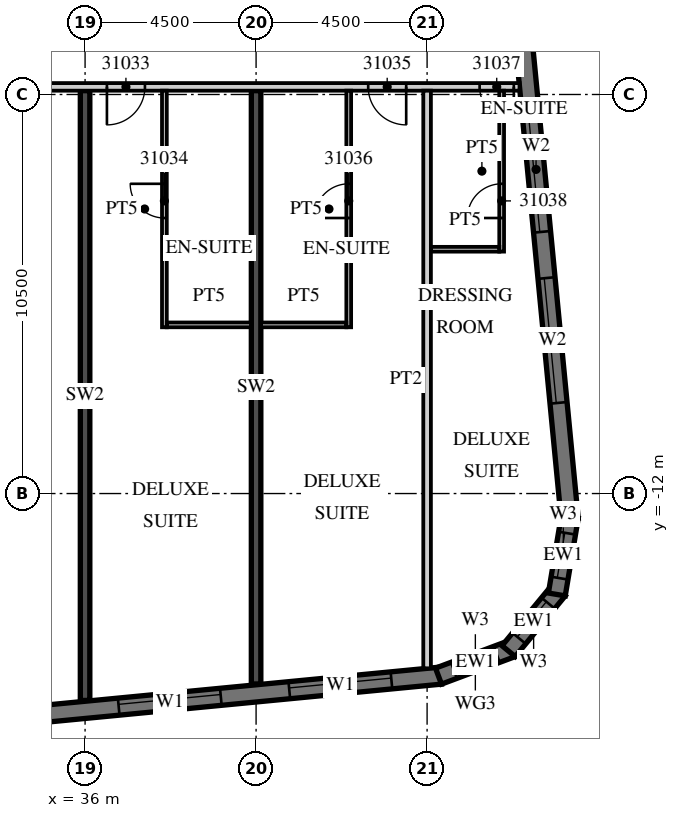
"""IFC4 building model, lengths in metres.
Left out: names, types, materials, properties, quantities, classifications, styles, units other than length and angle.
Written with IfcOpenShell. Run it as: python <this file> out.ifc"""

import sys

from ifc_helpers import new_model, si_unit, direction, frame, frame_2d, origin, place, context, subcontext, project, spatial, polyline, rectangle, outline, extrude, element, fill, save


model = new_model("IFC4")
c1 = context("Model", 3, precision=1e-05, world=origin(), true_north=direction((0.0, 1.0)))
c2 = subcontext(c1, "Body", "Model", "MODEL_VIEW")
j1 = project(units=[si_unit("LENGTHUNIT", "METRE"), si_unit("PLANEANGLEUNIT", "RADIAN")], contexts=[c1])
p1 = place(None, origin())
s1 = spatial("IfcSite", under=j1, at=p1, CompositionType="ELEMENT")
p2 = place(p1, origin())
s2 = spatial("IfcBuilding", under=s1, at=p2, CompositionType="ELEMENT")
p3 = place(p2, frame((0.0, 0.0, 137.2)))
s3 = spatial("IfcBuildingStorey", under=s2, at=p3, CompositionType="ELEMENT", Elevation=137.2)
p4 = place(p3, frame((36.0, -17.444, 0.0), z_axis=(0.0, 0.0, 1.0), x_axis=(0.0, 1.0, 0.0)))
e1 = element("IfcWall", 1, at=p4, inside=s3, PredefinedType="SHEAR", context=c2, shape_type="SweptSolid", body=[
    extrude(rectangle(XDim=16.044, YDim=0.25, at=frame_2d((8.022, 0.0))), origin(), (0.0, 0.0, 1.0), 3.3),
])
p5 = place(p3, frame((40.5, -17.011, 0.0), z_axis=(0.0, 0.0, 1.0), x_axis=(0.0, 1.0, 0.0)))
e2 = element("IfcWall", 2, at=p5, inside=s3, PredefinedType="SHEAR", context=c2, shape_type="SweptSolid", body=[
    extrude(rectangle(XDim=15.611, YDim=0.25, at=frame_2d((7.805, 0.0))), origin(), (0.0, 0.0, 1.0), 3.3),
])
p6 = place(p3, frame((-13.521, -22.46, 0.0), z_axis=(0.0, 0.0, 1.0), x_axis=(0.995396096335, 0.095846812164, 0.0)))
e3 = element("IfcWall", 3, at=p6, inside=s3, PredefinedType="SOLIDWALL", context=c2, shape_type="SweptSolid", body=[
    extrude(rectangle(XDim=59.151, YDim=0.45, at=frame_2d((29.575, 0.0))), origin(), (0.0, 0.0, 1.0), 3.02),
])
p7 = place(p6, frame((0.91, 0.0, 0.45)))
e4 = element("IfcOpeningElement", 4, at=p7, cuts=e3, PredefinedType="OPENING", context=c2, shape_type="SweptSolid", body=[
    extrude(rectangle(XDim=2.7, YDim=2.25, at=frame_2d((1.35, 1.125))), frame((0.0, 0.235, 0.0), z_axis=(0.0, -1.0, 0.0), x_axis=(1.0, 0.0, 0.0)), (0.0, 0.0, 1.0), 0.47),
])
p8 = place(p6, frame((5.431, 0.0, 0.45)))
e5 = element("IfcOpeningElement", 5, at=p8, cuts=e3, PredefinedType="OPENING", context=c2, shape_type="SweptSolid", body=[
    extrude(rectangle(XDim=2.7, YDim=2.25, at=frame_2d((1.35, 1.125))), frame((0.0, 0.235, 0.0), z_axis=(0.0, -1.0, 0.0), x_axis=(1.0, 0.0, 0.0)), (0.0, 0.0, 1.0), 0.47),
])
p9 = place(p6, frame((9.952, 0.0, 0.45)))
e6 = element("IfcOpeningElement", 6, at=p9, cuts=e3, PredefinedType="OPENING", context=c2, shape_type="SweptSolid", body=[
    extrude(rectangle(XDim=2.7, YDim=2.25, at=frame_2d((1.35, 1.125))), frame((0.0, 0.235, 0.0), z_axis=(0.0, -1.0, 0.0), x_axis=(1.0, 0.0, 0.0)), (0.0, 0.0, 1.0), 0.47),
])
p10 = place(p6, frame((14.473, 0.0, 0.45)))
e7 = element("IfcOpeningElement", 7, at=p10, cuts=e3, PredefinedType="OPENING", context=c2, shape_type="SweptSolid", body=[
    extrude(rectangle(XDim=2.7, YDim=2.25, at=frame_2d((1.35, 1.125))), frame((0.0, 0.235, 0.0), z_axis=(0.0, -1.0, 0.0), x_axis=(1.0, 0.0, 0.0)), (0.0, 0.0, 1.0), 0.47),
])
p11 = place(p6, frame((18.994, 0.0, 0.45)))
e8 = element("IfcOpeningElement", 8, at=p11, cuts=e3, PredefinedType="OPENING", context=c2, shape_type="SweptSolid", body=[
    extrude(rectangle(XDim=2.7, YDim=2.25, at=frame_2d((1.35, 1.125))), frame((0.0, 0.235, 0.0), z_axis=(0.0, -1.0, 0.0), x_axis=(1.0, 0.0, 0.0)), (0.0, 0.0, 1.0), 0.47),
])
p12 = place(p6, frame((23.514, 0.0, 0.45)))
e9 = element("IfcOpeningElement", 9, at=p12, cuts=e3, PredefinedType="OPENING", context=c2, shape_type="SweptSolid", body=[
    extrude(rectangle(XDim=2.7, YDim=2.25, at=frame_2d((1.35, 1.125))), frame((0.0, 0.235, 0.0), z_axis=(0.0, -1.0, 0.0), x_axis=(1.0, 0.0, 0.0)), (0.0, 0.0, 1.0), 0.47),
])
p13 = place(p6, frame((28.035, 0.0, 0.45)))
e10 = element("IfcOpeningElement", 10, at=p13, cuts=e3, PredefinedType="OPENING", context=c2, shape_type="SweptSolid", body=[
    extrude(rectangle(XDim=2.7, YDim=2.25, at=frame_2d((1.35, 1.125))), frame((0.0, 0.235, 0.0), z_axis=(0.0, -1.0, 0.0), x_axis=(1.0, 0.0, 0.0)), (0.0, 0.0, 1.0), 0.47),
])
p14 = place(p6, frame((32.556, 0.0, 0.45)))
e11 = element("IfcOpeningElement", 11, at=p14, cuts=e3, PredefinedType="OPENING", context=c2, shape_type="SweptSolid", body=[
    extrude(rectangle(XDim=2.7, YDim=2.25, at=frame_2d((1.35, 1.125))), frame((0.0, 0.235, 0.0), z_axis=(0.0, -1.0, 0.0), x_axis=(1.0, 0.0, 0.0)), (0.0, 0.0, 1.0), 0.47),
])
p15 = place(p6, frame((37.077, 0.0, 0.45)))
e12 = element("IfcOpeningElement", 12, at=p15, cuts=e3, PredefinedType="OPENING", context=c2, shape_type="SweptSolid", body=[
    extrude(rectangle(XDim=2.7, YDim=2.25, at=frame_2d((1.35, 1.125))), frame((0.0, 0.235, 0.0), z_axis=(0.0, -1.0, 0.0), x_axis=(1.0, 0.0, 0.0)), (0.0, 0.0, 1.0), 0.47),
])
p16 = place(p6, frame((41.598, 0.0, 0.45)))
e13 = element("IfcOpeningElement", 13, at=p16, cuts=e3, PredefinedType="OPENING", context=c2, shape_type="SweptSolid", body=[
    extrude(rectangle(XDim=2.7, YDim=2.25, at=frame_2d((1.35, 1.125))), frame((0.0, 0.235, 0.0), z_axis=(0.0, -1.0, 0.0), x_axis=(1.0, 0.0, 0.0)), (0.0, 0.0, 1.0), 0.47),
])
p17 = place(p6, frame((46.118, 0.0, 0.45)))
e14 = element("IfcOpeningElement", 14, at=p17, cuts=e3, PredefinedType="OPENING", context=c2, shape_type="SweptSolid", body=[
    extrude(rectangle(XDim=2.7, YDim=2.25, at=frame_2d((1.35, 1.125))), frame((0.0, 0.235, 0.0), z_axis=(0.0, -1.0, 0.0), x_axis=(1.0, 0.0, 0.0)), (0.0, 0.0, 1.0), 0.47),
])
p18 = place(p6, frame((50.639, 0.0, 0.45)))
e15 = element("IfcOpeningElement", 15, at=p18, cuts=e3, PredefinedType="OPENING", context=c2, shape_type="SweptSolid", body=[
    extrude(rectangle(XDim=2.7, YDim=2.25, at=frame_2d((1.35, 1.125))), frame((0.0, 0.235, 0.0), z_axis=(0.0, -1.0, 0.0), x_axis=(1.0, 0.0, 0.0)), (0.0, 0.0, 1.0), 0.47),
])
p19 = place(p6, frame((55.15, 0.0, 0.45)))
e16 = element("IfcOpeningElement", 16, at=p19, cuts=e3, PredefinedType="OPENING", context=c2, shape_type="SweptSolid", body=[
    extrude(rectangle(XDim=2.7, YDim=2.25, at=frame_2d((1.35, 1.125))), frame((0.0, 0.235, 0.0), z_axis=(0.0, -1.0, 0.0), x_axis=(1.0, 0.0, 0.0)), (0.0, 0.0, 1.0), 0.47),
])
p20 = place(p3, frame((45.3, -16.804, 0.0), z_axis=(0.0, 0.0, 1.0), x_axis=(0.936677599948, 0.350192909346, 0.0)))
e17 = element("IfcWall", 17, at=p20, inside=s3, PredefinedType="SOLIDWALL", context=c2, shape_type="SweptSolid", body=[
    extrude(outline(polyline([(0.0, -0.225), (2.071, -0.225), (1.95, 0.225), (0.121, 0.225), (0.0, -0.225)])), origin(), (0.0, 0.0, 1.0), 3.02),
])
p21 = place(p20, frame((0.435, 0.0, 0.45)))
e18 = element("IfcOpeningElement", 18, at=p21, cuts=e17, PredefinedType="OPENING", context=c2, shape_type="SweptSolid", body=[
    extrude(rectangle(XDim=1.2, YDim=2.25, at=frame_2d((0.6, 1.125))), frame((0.0, 0.235, 0.0), z_axis=(0.0, -1.0, 0.0), x_axis=(1.0, 0.0, 0.0)), (0.0, 0.0, 1.0), 0.47),
])
p22 = place(p3, frame((47.145, -16.147, 0.0), z_axis=(0.0, 0.0, 1.0), x_axis=(0.635988241739, 0.771698747161, 0.0)))
e19 = element("IfcWall", 19, at=p22, inside=s3, PredefinedType="SOLIDWALL", context=c2, shape_type="SweptSolid", body=[
    extrude(outline(polyline([(0.0, -0.225), (2.071, -0.225), (1.95, 0.225), (0.121, 0.225), (0.0, -0.225)])), origin(), (0.0, 0.0, 1.0), 3.02),
])
p23 = place(p22, frame((0.435, 0.0, 0.45)))
e20 = element("IfcOpeningElement", 20, at=p23, cuts=e19, PredefinedType="OPENING", context=c2, shape_type="SweptSolid", body=[
    extrude(rectangle(XDim=1.2, YDim=2.25, at=frame_2d((0.6, 1.125))), frame((0.0, 0.235, 0.0), z_axis=(0.0, -1.0, 0.0), x_axis=(1.0, 0.0, 0.0)), (0.0, 0.0, 1.0), 0.47),
])
p24 = place(p3, frame((48.413, -14.655, 0.0), z_axis=(0.0, 0.0, 1.0), x_axis=(0.165068144653, 0.986282164302, 0.0)))
e21 = element("IfcWall", 21, at=p24, inside=s3, PredefinedType="SOLIDWALL", context=c2, shape_type="SweptSolid", body=[
    extrude(outline(polyline([(0.0, -0.225), (2.071, -0.225), (1.95, 0.225), (0.121, 0.225), (0.0, -0.225)])), origin(), (0.0, 0.0, 1.0), 3.02),
])
p25 = place(p24, frame((0.435, 0.0, 0.45)))
e22 = element("IfcOpeningElement", 22, at=p25, cuts=e21, PredefinedType="OPENING", context=c2, shape_type="SweptSolid", body=[
    extrude(rectangle(XDim=1.2, YDim=2.25, at=frame_2d((0.6, 1.125))), frame((0.0, 0.235, 0.0), z_axis=(0.0, -1.0, 0.0), x_axis=(1.0, 0.0, 0.0)), (0.0, 0.0, 1.0), 0.47),
])
p26 = place(p3, frame((48.753, -12.672, 0.0), z_axis=(0.0, 0.0, 1.0), x_axis=(-0.095842661909, 0.995396495954, 0.0)))
e23 = element("IfcWall", 23, at=p26, inside=s3, PredefinedType="SOLIDWALL", context=c2, shape_type="SweptSolid", body=[
    extrude(rectangle(XDim=35.0, YDim=0.45, at=frame_2d((17.5, 0.0))), origin(), (0.0, 0.0, 1.0), 3.02),
])
p27 = place(p26, frame((3.072, 0.0, 0.45)))
e24 = element("IfcOpeningElement", 24, at=p27, cuts=e23, PredefinedType="OPENING", context=c2, shape_type="SweptSolid", body=[
    extrude(rectangle(XDim=3.3, YDim=2.25, at=frame_2d((1.65, 1.125))), frame((0.0, 0.235, 0.0), z_axis=(0.0, -1.0, 0.0), x_axis=(1.0, 0.0, 0.0)), (0.0, 0.0, 1.0), 0.47),
])
p28 = place(p26, frame((7.593, 0.0, 0.45)))
e25 = element("IfcOpeningElement", 25, at=p28, cuts=e23, PredefinedType="OPENING", context=c2, shape_type="SweptSolid", body=[
    extrude(rectangle(XDim=3.3, YDim=2.25, at=frame_2d((1.65, 1.125))), frame((0.0, 0.235, 0.0), z_axis=(0.0, -1.0, 0.0), x_axis=(1.0, 0.0, 0.0)), (0.0, 0.0, 1.0), 0.47),
])
p29 = place(p3, frame((-13.5, -1.3, 0.0), z_axis=(0.0, 0.0, 1.0), x_axis=(1.0, 0.0, 0.0)))
e26 = element("IfcWall", 26, at=p29, inside=s3, PredefinedType="PARTITIONING", context=c2, shape_type="SweptSolid", body=[
    extrude(rectangle(XDim=60.932, YDim=0.2, at=frame_2d((30.466, 0.0))), origin(), (0.0, 0.0, 1.0), 3.02),
])
p30 = place(p29, frame((2.925, 0.0, 0.0)))
e27 = element("IfcOpeningElement", 27, at=p30, cuts=e26, PredefinedType="OPENING", context=c2, shape_type="SweptSolid", body=[
    extrude(rectangle(XDim=1.0, YDim=2.1, at=frame_2d((0.5, 1.05))), frame((0.0, 0.11, 0.0), z_axis=(0.0, -1.0, 0.0), x_axis=(1.0, 0.0, 0.0)), (0.0, 0.0, 1.0), 0.22),
])
p31 = place(p29, frame((7.45, 0.0, 0.0)))
e28 = element("IfcOpeningElement", 28, at=p31, cuts=e26, PredefinedType="OPENING", context=c2, shape_type="SweptSolid", body=[
    extrude(rectangle(XDim=1.0, YDim=2.1, at=frame_2d((0.5, 1.05))), frame((0.0, 0.11, 0.0), z_axis=(0.0, -1.0, 0.0), x_axis=(1.0, 0.0, 0.0)), (0.0, 0.0, 1.0), 0.22),
])
p32 = place(p29, frame((9.55, 0.0, 0.0)))
e29 = element("IfcOpeningElement", 29, at=p32, cuts=e26, PredefinedType="OPENING", context=c2, shape_type="SweptSolid", body=[
    extrude(rectangle(XDim=1.0, YDim=2.1, at=frame_2d((0.5, 1.05))), frame((0.0, 0.11, 0.0), z_axis=(0.0, -1.0, 0.0), x_axis=(1.0, 0.0, 0.0)), (0.0, 0.0, 1.0), 0.22),
])
p33 = place(p29, frame((15.938, 0.0, 0.0)))
e30 = element("IfcOpeningElement", 30, at=p33, cuts=e26, PredefinedType="OPENING", context=c2, shape_type="SweptSolid", body=[
    extrude(rectangle(XDim=1.2, YDim=2.1, at=frame_2d((0.6, 1.05))), frame((0.0, 0.11, 0.0), z_axis=(0.0, -1.0, 0.0), x_axis=(1.0, 0.0, 0.0)), (0.0, 0.0, 1.0), 0.22),
])
p34 = place(p29, frame((24.938, 0.0, 0.0)))
e31 = element("IfcOpeningElement", 31, at=p34, cuts=e26, PredefinedType="OPENING", context=c2, shape_type="SweptSolid", body=[
    extrude(rectangle(XDim=1.2, YDim=2.1, at=frame_2d((0.6, 1.05))), frame((0.0, 0.11, 0.0), z_axis=(0.0, -1.0, 0.0), x_axis=(1.0, 0.0, 0.0)), (0.0, 0.0, 1.0), 0.22),
])
p35 = place(p29, frame((32.075, 0.0, 0.0)))
e32 = element("IfcOpeningElement", 32, at=p35, cuts=e26, PredefinedType="OPENING", context=c2, shape_type="SweptSolid", body=[
    extrude(rectangle(XDim=1.0, YDim=2.1, at=frame_2d((0.5, 1.05))), frame((0.0, 0.11, 0.0), z_axis=(0.0, -1.0, 0.0), x_axis=(1.0, 0.0, 0.0)), (0.0, 0.0, 1.0), 0.22),
])
p36 = place(p29, frame((36.55, 0.0, 0.0)))
e33 = element("IfcOpeningElement", 33, at=p36, cuts=e26, PredefinedType="OPENING", context=c2, shape_type="SweptSolid", body=[
    extrude(rectangle(XDim=1.0, YDim=2.1, at=frame_2d((0.5, 1.05))), frame((0.0, 0.11, 0.0), z_axis=(0.0, -1.0, 0.0), x_axis=(1.0, 0.0, 0.0)), (0.0, 0.0, 1.0), 0.22),
])
p37 = place(p29, frame((45.862, 0.0, 0.0)))
e34 = element("IfcOpeningElement", 34, at=p37, cuts=e26, PredefinedType="OPENING", context=c2, shape_type="SweptSolid", body=[
    extrude(rectangle(XDim=1.2, YDim=2.1, at=frame_2d((0.6, 1.05))), frame((0.0, 0.11, 0.0), z_axis=(0.0, -1.0, 0.0), x_axis=(1.0, 0.0, 0.0)), (0.0, 0.0, 1.0), 0.22),
])
p38 = place(p29, frame((50.075, 0.0, 0.0)))
e35 = element("IfcOpeningElement", 35, at=p38, cuts=e26, PredefinedType="OPENING", context=c2, shape_type="SweptSolid", body=[
    extrude(rectangle(XDim=1.0, YDim=2.1, at=frame_2d((0.5, 1.05))), frame((0.0, 0.11, 0.0), z_axis=(0.0, -1.0, 0.0), x_axis=(1.0, 0.0, 0.0)), (0.0, 0.0, 1.0), 0.22),
])
p39 = place(p29, frame((56.95, 0.0, 0.0)))
e36 = element("IfcOpeningElement", 36, at=p39, cuts=e26, PredefinedType="OPENING", context=c2, shape_type="SweptSolid", body=[
    extrude(rectangle(XDim=1.0, YDim=2.1, at=frame_2d((0.5, 1.05))), frame((0.0, 0.11, 0.0), z_axis=(0.0, -1.0, 0.0), x_axis=(1.0, 0.0, 0.0)), (0.0, 0.0, 1.0), 0.22),
])
p40 = place(p29, frame((59.882, 0.0, 0.0)))
e37 = element("IfcOpeningElement", 37, at=p40, cuts=e26, PredefinedType="OPENING", context=c2, shape_type="SweptSolid", body=[
    extrude(rectangle(XDim=0.9, YDim=2.1, at=frame_2d((0.45, 1.05))), frame((0.0, 0.11, 0.0), z_axis=(0.0, -1.0, 0.0), x_axis=(1.0, 0.0, 0.0)), (0.0, 0.0, 1.0), 0.22),
])
p41 = place(p3, frame((38.087, -7.625, 0.0), z_axis=(0.0, 0.0, 1.0), x_axis=(0.0, 1.0, 0.0)))
e38 = element("IfcWall", 38, at=p41, inside=s3, PredefinedType="PARTITIONING", context=c2, shape_type="SweptSolid", body=[
    extrude(rectangle(XDim=6.225, YDim=0.125, at=frame_2d((3.113, 0.0))), origin(), (0.0, 0.0, 1.0), 3.02),
])
p42 = place(p41, frame((2.875, 0.0, 0.0)))
e39 = element("IfcOpeningElement", 39, at=p42, cuts=e38, PredefinedType="OPENING", context=c2, shape_type="SweptSolid", body=[
    extrude(rectangle(XDim=0.9, YDim=2.1, at=frame_2d((0.45, 1.05))), frame((0.0, 0.073, 0.0), z_axis=(0.0, -1.0, 0.0), x_axis=(1.0, 0.0, 0.0)), (0.0, 0.0, 1.0), 0.145),
])
p43 = place(p3, frame((38.15, -7.562, 0.0), z_axis=(0.0, 0.0, 1.0), x_axis=(1.0, 0.0, 0.0)))
e40 = element("IfcWall", 40, at=p43, inside=s3, PredefinedType="PARTITIONING", context=c2, shape_type="SweptSolid", body=[
    extrude(rectangle(XDim=2.225, YDim=0.125, at=frame_2d((1.113, 0.0))), origin(), (0.0, 0.0, 1.0), 3.02),
])
p44 = place(p3, frame((45.0, -16.599, 0.0), z_axis=(0.0, 0.0, 1.0), x_axis=(0.0, 1.0, 0.0)))
e41 = element("IfcWall", 41, at=p44, inside=s3, PredefinedType="PARTITIONING", context=c2, shape_type="SweptSolid", body=[
    extrude(rectangle(XDim=15.199, YDim=0.2, at=frame_2d((7.6, 0.0))), origin(), (0.0, 0.0, 1.0), 3.02),
])
p45 = place(p3, frame((42.938, -7.625, 0.0), z_axis=(0.0, 0.0, 1.0), x_axis=(0.0, 1.0, 0.0)))
e42 = element("IfcWall", 42, at=p45, inside=s3, PredefinedType="PARTITIONING", context=c2, shape_type="SweptSolid", body=[
    extrude(rectangle(XDim=6.225, YDim=0.125, at=frame_2d((3.113, 0.0))), origin(), (0.0, 0.0, 1.0), 3.02),
])
p46 = place(p45, frame((2.875, 0.0, 0.0)))
e43 = element("IfcOpeningElement", 43, at=p46, cuts=e42, PredefinedType="OPENING", context=c2, shape_type="SweptSolid", body=[
    extrude(rectangle(XDim=0.9, YDim=2.1, at=frame_2d((0.45, 1.05))), frame((0.0, 0.073, 0.0), z_axis=(0.0, -1.0, 0.0), x_axis=(1.0, 0.0, 0.0)), (0.0, 0.0, 1.0), 0.145),
])
p47 = place(p3, frame((40.625, -7.562, 0.0), z_axis=(0.0, 0.0, 1.0), x_axis=(1.0, 0.0, 0.0)))
e44 = element("IfcWall", 44, at=p47, inside=s3, PredefinedType="PARTITIONING", context=c2, shape_type="SweptSolid", body=[
    extrude(rectangle(XDim=2.25, YDim=0.125, at=frame_2d((1.125, 0.0))), origin(), (0.0, 0.0, 1.0), 3.02),
])
p48 = place(p3, frame((46.962, -5.634, 0.0), z_axis=(0.0, 0.0, 1.0), x_axis=(0.0, 1.0, 0.0)))
e45 = element("IfcWall", 45, at=p48, inside=s3, PredefinedType="PARTITIONING", context=c2, shape_type="SweptSolid", body=[
    extrude(rectangle(XDim=4.234, YDim=0.125, at=frame_2d((2.117, 0.0))), origin(), (0.0, 0.0, 1.0), 3.02),
])
p49 = place(p48, frame((0.884, 0.0, 0.0)))
e46 = element("IfcOpeningElement", 46, at=p49, cuts=e45, PredefinedType="OPENING", context=c2, shape_type="SweptSolid", body=[
    extrude(rectangle(XDim=0.9, YDim=2.1, at=frame_2d((0.45, 1.05))), frame((0.0, 0.073, 0.0), z_axis=(0.0, -1.0, 0.0), x_axis=(1.0, 0.0, 0.0)), (0.0, 0.0, 1.0), 0.145),
])
p50 = place(p3, frame((45.1, -5.572, 0.0), z_axis=(0.0, 0.0, 1.0), x_axis=(1.0, 0.0, 0.0)))
e47 = element("IfcWall", 47, at=p50, inside=s3, PredefinedType="PARTITIONING", context=c2, shape_type="SweptSolid", body=[
    extrude(rectangle(XDim=1.8, YDim=0.125, at=frame_2d((0.9, 0.0))), origin(), (0.0, 0.0, 1.0), 3.02),
])
p51 = place(p18, origin())
e48 = element("IfcWindow", 48, at=p51, inside=s3, PartitioningType="SINGLE_PANEL", PredefinedType="WINDOW", context=c2, shape_type="SweptSolid", body=[
    extrude(rectangle(XDim=2.7, YDim=2.25, at=frame_2d((1.35, 1.125))), frame((0.0, 0.09, 0.0), z_axis=(0.0, -1.0, 0.0), x_axis=(1.0, 0.0, 0.0)), (0.0, 0.0, 1.0), 0.06),
])
fill(e15, e48)
p52 = place(p19, origin())
e49 = element("IfcWindow", 49, at=p52, inside=s3, PartitioningType="SINGLE_PANEL", PredefinedType="WINDOW", context=c2, shape_type="SweptSolid", body=[
    extrude(rectangle(XDim=2.7, YDim=2.25, at=frame_2d((1.35, 1.125))), frame((0.0, 0.09, 0.0), z_axis=(0.0, -1.0, 0.0), x_axis=(1.0, 0.0, 0.0)), (0.0, 0.0, 1.0), 0.06),
])
fill(e16, e49)
p53 = place(p21, origin())
e50 = element("IfcWindow", 50, at=p53, inside=s3, PartitioningType="SINGLE_PANEL", PredefinedType="WINDOW", context=c2, shape_type="SweptSolid", body=[
    extrude(rectangle(XDim=1.2, YDim=2.25, at=frame_2d((0.6, 1.125))), frame((0.0, 0.09, 0.0), z_axis=(0.0, -1.0, 0.0), x_axis=(1.0, 0.0, 0.0)), (0.0, 0.0, 1.0), 0.06),
])
fill(e18, e50)
p54 = place(p23, origin())
e51 = element("IfcWindow", 51, at=p54, inside=s3, PartitioningType="SINGLE_PANEL", PredefinedType="WINDOW", context=c2, shape_type="SweptSolid", body=[
    extrude(rectangle(XDim=1.2, YDim=2.25, at=frame_2d((0.6, 1.125))), frame((0.0, 0.09, 0.0), z_axis=(0.0, -1.0, 0.0), x_axis=(1.0, 0.0, 0.0)), (0.0, 0.0, 1.0), 0.06),
])
fill(e20, e51)
p55 = place(p25, origin())
e52 = element("IfcWindow", 52, at=p55, inside=s3, PartitioningType="SINGLE_PANEL", PredefinedType="WINDOW", context=c2, shape_type="SweptSolid", body=[
    extrude(rectangle(XDim=1.2, YDim=2.25, at=frame_2d((0.6, 1.125))), frame((0.0, 0.09, 0.0), z_axis=(0.0, -1.0, 0.0), x_axis=(1.0, 0.0, 0.0)), (0.0, 0.0, 1.0), 0.06),
])
fill(e22, e52)
p56 = place(p27, origin())
e53 = element("IfcWindow", 53, at=p56, inside=s3, PartitioningType="SINGLE_PANEL", PredefinedType="WINDOW", context=c2, shape_type="SweptSolid", body=[
    extrude(rectangle(XDim=3.3, YDim=2.25, at=frame_2d((1.65, 1.125))), frame((0.0, 0.09, 0.0), z_axis=(0.0, -1.0, 0.0), x_axis=(1.0, 0.0, 0.0)), (0.0, 0.0, 1.0), 0.06),
])
fill(e24, e53)
p57 = place(p28, origin())
e54 = element("IfcWindow", 54, at=p57, inside=s3, PartitioningType="SINGLE_PANEL", PredefinedType="WINDOW", context=c2, shape_type="SweptSolid", body=[
    extrude(rectangle(XDim=3.3, YDim=2.25, at=frame_2d((1.65, 1.125))), frame((0.0, 0.09, 0.0), z_axis=(0.0, -1.0, 0.0), x_axis=(1.0, 0.0, 0.0)), (0.0, 0.0, 1.0), 0.06),
])
fill(e25, e54)
p58 = place(p38, origin())
e55 = element("IfcDoor", 55, at=p58, inside=s3, OperationType="SINGLE_SWING_LEFT", PredefinedType="DOOR", context=c2, shape_type="SweptSolid", body=[
    extrude(rectangle(XDim=1.0, YDim=2.1, at=frame_2d((0.5, 1.05))), frame((0.0, 0.025, 0.0), z_axis=(0.0, -1.0, 0.0), x_axis=(1.0, 0.0, 0.0)), (0.0, 0.0, 1.0), 0.05),
])
fill(e35, e55)
p59 = place(p42, origin())
e56 = element("IfcDoor", 56, at=p59, inside=s3, OperationType="SINGLE_SWING_RIGHT", PredefinedType="DOOR", context=c2, shape_type="SweptSolid", body=[
    extrude(rectangle(XDim=0.9, YDim=2.1, at=frame_2d((0.45, 1.05))), frame((0.0, 0.025, 0.0), z_axis=(0.0, -1.0, 0.0), x_axis=(1.0, 0.0, 0.0)), (0.0, 0.0, 1.0), 0.05),
])
fill(e39, e56)
p60 = place(p39, origin())
e57 = element("IfcDoor", 57, at=p60, inside=s3, OperationType="SINGLE_SWING_RIGHT", PredefinedType="DOOR", context=c2, shape_type="SweptSolid", body=[
    extrude(rectangle(XDim=1.0, YDim=2.1, at=frame_2d((0.5, 1.05))), frame((0.0, 0.025, 0.0), z_axis=(0.0, -1.0, 0.0), x_axis=(1.0, 0.0, 0.0)), (0.0, 0.0, 1.0), 0.05),
])
fill(e36, e57)
p61 = place(p46, origin())
e58 = element("IfcDoor", 58, at=p61, inside=s3, OperationType="SINGLE_SWING_LEFT", PredefinedType="DOOR", context=c2, shape_type="SweptSolid", body=[
    extrude(rectangle(XDim=0.9, YDim=2.1, at=frame_2d((0.45, 1.05))), frame((0.0, 0.025, 0.0), z_axis=(0.0, -1.0, 0.0), x_axis=(1.0, 0.0, 0.0)), (0.0, 0.0, 1.0), 0.05),
])
fill(e43, e58)
p62 = place(p40, origin())
e59 = element("IfcDoor", 59, at=p62, inside=s3, OperationType="SINGLE_SWING_RIGHT", PredefinedType="DOOR", context=c2, shape_type="SweptSolid", body=[
    extrude(rectangle(XDim=0.9, YDim=2.1, at=frame_2d((0.45, 1.05))), frame((0.0, 0.025, 0.0), z_axis=(0.0, -1.0, 0.0), x_axis=(1.0, 0.0, 0.0)), (0.0, 0.0, 1.0), 0.05),
])
fill(e37, e59)
p63 = place(p49, origin())
e60 = element("IfcDoor", 60, at=p63, inside=s3, OperationType="SINGLE_SWING_LEFT", PredefinedType="DOOR", context=c2, shape_type="SweptSolid", body=[
    extrude(rectangle(XDim=0.9, YDim=2.1, at=frame_2d((0.45, 1.05))), frame((0.0, 0.025, 0.0), z_axis=(0.0, -1.0, 0.0), x_axis=(1.0, 0.0, 0.0)), (0.0, 0.0, 1.0), 0.05),
])
fill(e46, e60)
save(model, sys.argv[1])
